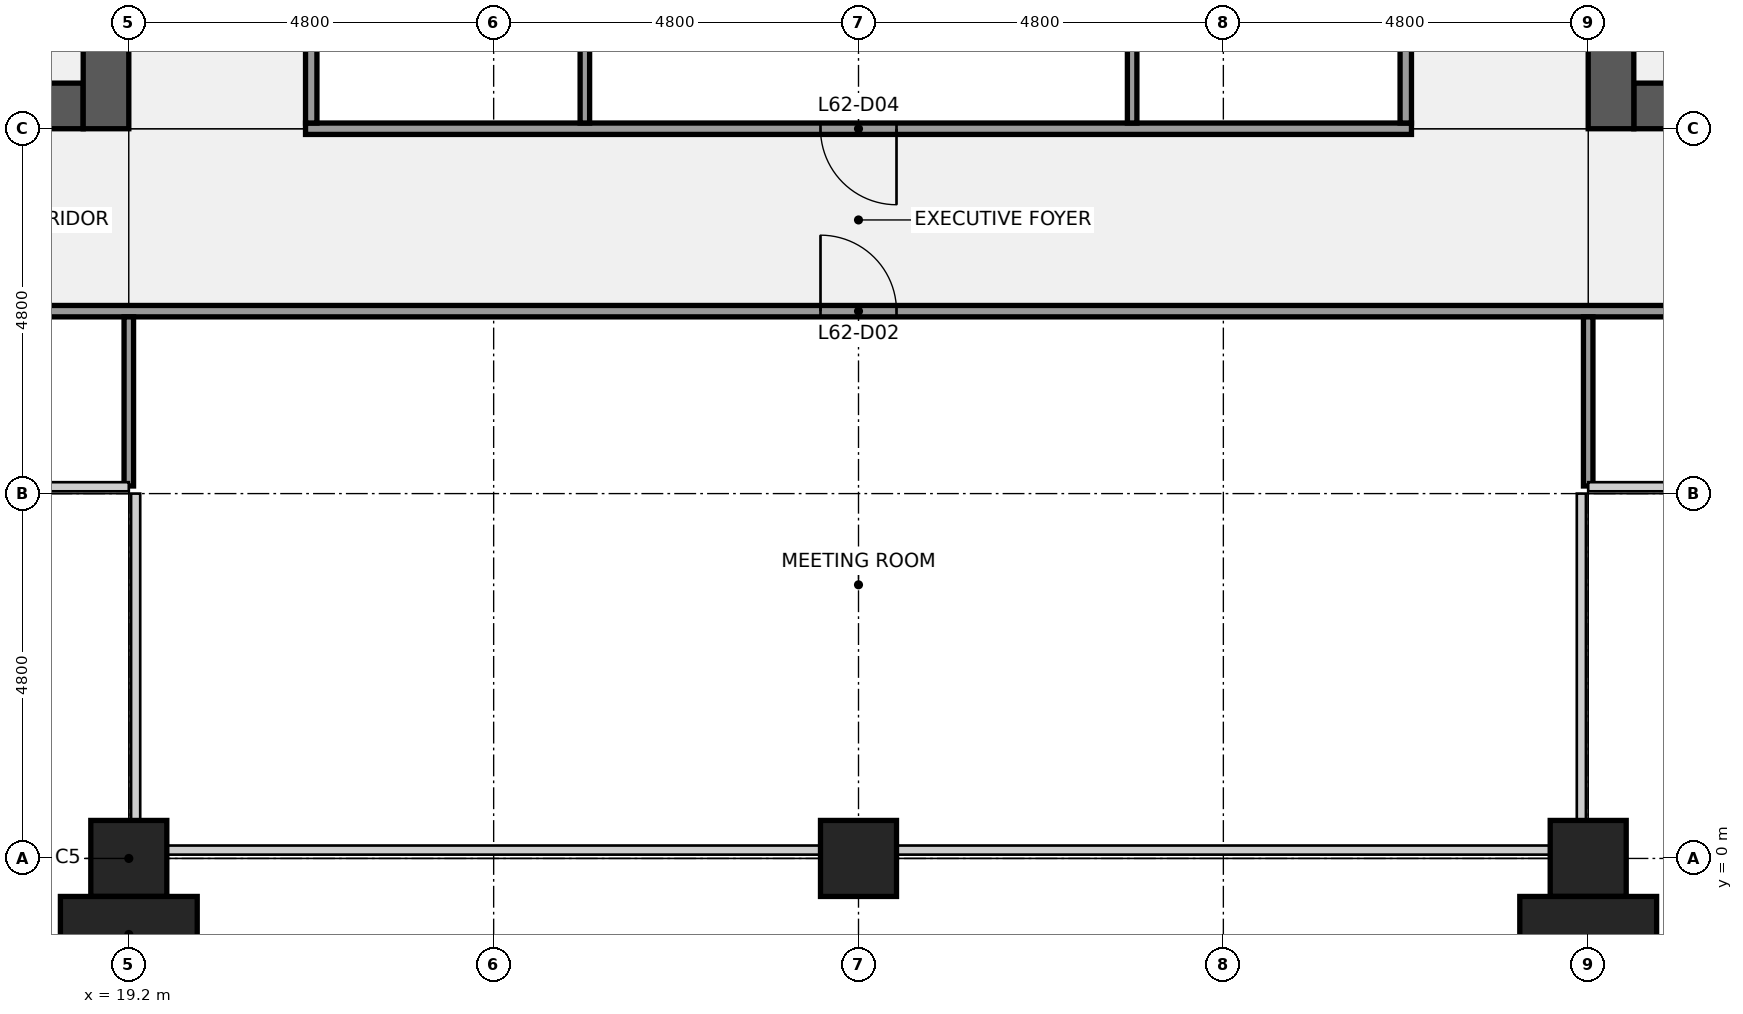
"""IFC4 building model, lengths in metres.
Left out: names, types, materials, properties, quantities, classifications, styles, units other than length and angle.
Written with IfcOpenShell. Run it as: python <this file> out.ifc"""

import sys

from ifc_helpers import new_model, si_unit, direction, frame, frame_2d, origin, origin_2d, place, context, subcontext, project, spatial, rectangle, extrude, element, fill, save


model = new_model("IFC4")
c1 = context("Model", 3, precision=1e-05, world=origin(), true_north=direction((0.0, 1.0)))
c2 = subcontext(c1, "Body", "Model", "MODEL_VIEW")
j1 = project(units=[si_unit("LENGTHUNIT", "METRE"), si_unit("PLANEANGLEUNIT", "RADIAN")], contexts=[c1])
p1 = place(None, origin())
s1 = spatial("IfcSite", under=j1, at=p1, CompositionType="ELEMENT")
p2 = place(p1, origin())
s2 = spatial("IfcBuilding", under=s1, at=p2, CompositionType="ELEMENT")
p3 = place(p2, frame((0.0, 0.0, 286.3)))
s3 = spatial("IfcBuildingStorey", under=s2, at=p3, CompositionType="ELEMENT", Elevation=286.3)
for number, where, z_axis, x_axis in (
    (1, (19.2, 0.0, 0.0), (0.0, 0.0, 1.0), (1.0, 0.0, 0.0)),
    (2, (28.8, 0.0, 0.0), (0.0, 0.0, 1.0), (1.0, 0.0, 0.0)),
    (3, (38.4, 0.0, 0.0), (0.0, 0.0, 1.0), (1.0, 0.0, 0.0)),
):
    element("IfcColumn", number, at=place(p3, frame(where, z_axis=z_axis, x_axis=x_axis)), inside=s3, PredefinedType="COLUMN", context=c2, shape_type="SweptSolid", body=[
        extrude(rectangle(XDim=1.0, YDim=1.0, at=origin_2d()), origin(), (0.0, 0.0, 1.0), 4.0),
    ])
p4 = place(p3, frame((18.6, 9.9, 0.0), z_axis=(0.0, 0.0, 1.0), x_axis=(-1.0, 0.0, 0.0)))
e4 = element("IfcWall", 4, at=p4, inside=s3, PredefinedType="SHEAR", context=c2, shape_type="SweptSolid", body=[
    extrude(rectangle(XDim=4.2, YDim=0.6, at=frame_2d((2.1, 0.0))), origin(), (0.0, 0.0, 1.0), 3.84),
])
p5 = place(p4, frame((1.25, 0.0, 0.0)))
e5 = element("IfcOpeningElement", 5, at=p5, cuts=e4, PredefinedType="OPENING", context=c2, shape_type="SweptSolid", body=[
    extrude(rectangle(XDim=1.1, YDim=2.1, at=frame_2d((0.55, 1.05))), frame((0.0, 0.31, 0.0), z_axis=(0.0, -1.0, 0.0), x_axis=(1.0, 0.0, 0.0)), (0.0, 0.0, 1.0), 0.62),
])
p6 = place(p3, frame((18.9, 38.4, 0.0), z_axis=(0.0, 0.0, 1.0), x_axis=(0.0, -1.0, 0.0)))
e6 = element("IfcWall", 6, at=p6, inside=s3, PredefinedType="SHEAR", context=c2, shape_type="SweptSolid", body=[
    extrude(rectangle(XDim=28.8, YDim=0.6, at=frame_2d((14.4, 0.0))), origin(), (0.0, 0.0, 1.0), 3.84),
])
p7 = place(p6, frame((18.3, 0.0, 0.0)))
e7 = element("IfcOpeningElement", 7, at=p7, cuts=e6, PredefinedType="OPENING", context=c2, shape_type="SweptSolid", body=[
    extrude(rectangle(XDim=1.8, YDim=2.1, at=frame_2d((0.9, 1.05))), frame((0.0, 0.31, 0.0), z_axis=(0.0, -1.0, 0.0), x_axis=(1.0, 0.0, 0.0)), (0.0, 0.0, 1.0), 0.62),
])
p8 = place(p6, frame((8.7, 0.0, 0.0)))
e8 = element("IfcOpeningElement", 8, at=p8, cuts=e6, PredefinedType="OPENING", context=c2, shape_type="SweptSolid", body=[
    extrude(rectangle(XDim=1.8, YDim=2.1, at=frame_2d((0.9, 1.05))), frame((0.0, 0.31, 0.0), z_axis=(0.0, -1.0, 0.0), x_axis=(1.0, 0.0, 0.0)), (0.0, 0.0, 1.0), 0.62),
])
p9 = place(p3, frame((43.2, 9.9, 0.0), z_axis=(0.0, 0.0, 1.0), x_axis=(-1.0, 0.0, 0.0)))
e9 = element("IfcWall", 9, at=p9, inside=s3, PredefinedType="SHEAR", context=c2, shape_type="SweptSolid", body=[
    extrude(rectangle(XDim=4.2, YDim=0.6, at=frame_2d((2.1, 0.0))), origin(), (0.0, 0.0, 1.0), 3.84),
])
p10 = place(p9, frame((1.85, 0.0, 0.0)))
e10 = element("IfcOpeningElement", 10, at=p10, cuts=e9, PredefinedType="OPENING", context=c2, shape_type="SweptSolid", body=[
    extrude(rectangle(XDim=1.1, YDim=2.1, at=frame_2d((0.55, 1.05))), frame((0.0, 0.31, 0.0), z_axis=(0.0, -1.0, 0.0), x_axis=(1.0, 0.0, 0.0)), (0.0, 0.0, 1.0), 0.62),
])
p11 = place(p3, frame((38.7, 9.6, 0.0), z_axis=(0.0, 0.0, 1.0), x_axis=(0.0, 1.0, 0.0)))
e11 = element("IfcWall", 11, at=p11, inside=s3, PredefinedType="SHEAR", context=c2, shape_type="SweptSolid", body=[
    extrude(rectangle(XDim=28.8, YDim=0.6, at=frame_2d((14.4, 0.0))), origin(), (0.0, 0.0, 1.0), 3.84),
])
p12 = place(p11, frame((8.7, 0.0, 0.0)))
e12 = element("IfcOpeningElement", 12, at=p12, cuts=e11, PredefinedType="OPENING", context=c2, shape_type="SweptSolid", body=[
    extrude(rectangle(XDim=1.8, YDim=2.1, at=frame_2d((0.9, 1.05))), frame((0.0, 0.31, 0.0), z_axis=(0.0, -1.0, 0.0), x_axis=(1.0, 0.0, 0.0)), (0.0, 0.0, 1.0), 0.62),
])
p13 = place(p11, frame((18.3, 0.0, 0.0)))
e13 = element("IfcOpeningElement", 13, at=p13, cuts=e11, PredefinedType="OPENING", context=c2, shape_type="SweptSolid", body=[
    extrude(rectangle(XDim=1.8, YDim=2.1, at=frame_2d((0.9, 1.05))), frame((0.0, 0.31, 0.0), z_axis=(0.0, -1.0, 0.0), x_axis=(1.0, 0.0, 0.0)), (0.0, 0.0, 1.0), 0.62),
])
p14 = place(p3, frame((14.5, 7.2, 0.0), z_axis=(0.0, 0.0, 1.0), x_axis=(1.0, 0.0, 0.0)))
e14 = element("IfcWall", 14, at=p14, inside=s3, PredefinedType="PARTITIONING", context=c2, shape_type="SweptSolid", body=[
    extrude(rectangle(XDim=28.6, YDim=0.15, at=frame_2d((14.3, 0.0))), origin(), (0.0, 0.0, 1.0), 2.849),
])
p15 = place(p14, frame((1.85, 0.0, 0.0)))
e15 = element("IfcOpeningElement", 15, at=p15, cuts=e14, PredefinedType="OPENING", context=c2, shape_type="SweptSolid", body=[
    extrude(rectangle(XDim=1.0, YDim=2.1, at=frame_2d((0.5, 1.05))), frame((0.0, 0.085, 0.0), z_axis=(0.0, -1.0, 0.0), x_axis=(1.0, 0.0, 0.0)), (0.0, 0.0, 1.0), 0.17),
])
p16 = place(p14, frame((13.8, 0.0, 0.0)))
e16 = element("IfcOpeningElement", 16, at=p16, cuts=e14, PredefinedType="OPENING", context=c2, shape_type="SweptSolid", body=[
    extrude(rectangle(XDim=1.0, YDim=2.1, at=frame_2d((0.5, 1.05))), frame((0.0, 0.085, 0.0), z_axis=(0.0, -1.0, 0.0), x_axis=(1.0, 0.0, 0.0)), (0.0, 0.0, 1.0), 0.17),
])
p17 = place(p14, frame((25.75, 0.0, 0.0)))
e17 = element("IfcOpeningElement", 17, at=p17, cuts=e14, PredefinedType="OPENING", context=c2, shape_type="SweptSolid", body=[
    extrude(rectangle(XDim=1.0, YDim=2.1, at=frame_2d((0.5, 1.05))), frame((0.0, 0.085, 0.0), z_axis=(0.0, -1.0, 0.0), x_axis=(1.0, 0.0, 0.0)), (0.0, 0.0, 1.0), 0.17),
])
p18 = place(p3, frame((21.525, 9.6, 0.0), z_axis=(0.0, 0.0, 1.0), x_axis=(1.0, 0.0, 0.0)))
e18 = element("IfcWall", 18, at=p18, inside=s3, PredefinedType="PARTITIONING", context=c2, shape_type="SweptSolid", body=[
    extrude(rectangle(XDim=14.55, YDim=0.15, at=frame_2d((7.275, 0.0))), origin(), (0.0, 0.0, 1.0), 2.849),
])
p19 = place(p18, frame((6.775, 0.0, 0.0)))
e19 = element("IfcOpeningElement", 19, at=p19, cuts=e18, PredefinedType="OPENING", context=c2, shape_type="SweptSolid", body=[
    extrude(rectangle(XDim=1.0, YDim=2.1, at=frame_2d((0.5, 1.05))), frame((0.0, 0.085, 0.0), z_axis=(0.0, -1.0, 0.0), x_axis=(1.0, 0.0, 0.0)), (0.0, 0.0, 1.0), 0.17),
])
p20 = place(p3, frame((19.2, 4.9, 0.0), z_axis=(0.0, 0.0, 1.0), x_axis=(0.0, 1.0, 0.0)))
e20 = element("IfcWall", 20, at=p20, inside=s3, PredefinedType="PARTITIONING", context=c2, shape_type="SweptSolid", body=[
    extrude(rectangle(XDim=2.225, YDim=0.125, at=frame_2d((1.113, 0.0))), origin(), (0.0, 0.0, 1.0), 2.849),
])
p21 = place(p3, frame((21.6, 9.675, 0.0), z_axis=(0.0, 0.0, 1.0), x_axis=(0.0, 1.0, 0.0)))
e21 = element("IfcWall", 21, at=p21, inside=s3, PredefinedType="PARTITIONING", context=c2, shape_type="SweptSolid", body=[
    extrude(rectangle(XDim=4.65, YDim=0.15, at=frame_2d((2.325, 0.0))), origin(), (0.0, 0.0, 1.0), 2.849),
])
p22 = place(p21, frame((1.825, 0.0, 0.0)))
e22 = element("IfcOpeningElement", 22, at=p22, cuts=e21, PredefinedType="OPENING", context=c2, shape_type="SweptSolid", body=[
    extrude(rectangle(XDim=1.0, YDim=2.1, at=frame_2d((0.5, 1.05))), frame((0.0, 0.085, 0.0), z_axis=(0.0, -1.0, 0.0), x_axis=(1.0, 0.0, 0.0)), (0.0, 0.0, 1.0), 0.17),
])
for number, where, z_axis, x_axis in (
    (23, (25.2, 9.675, 0.0), (0.0, 0.0, 1.0), (0.0, 1.0, 0.0)),
    (24, (32.4, 9.675, 0.0), (0.0, 0.0, 1.0), (0.0, 1.0, 0.0)),
):
    element("IfcWall", number, at=place(p3, frame(where, z_axis=z_axis, x_axis=x_axis)), inside=s3, PredefinedType="PARTITIONING", context=c2, shape_type="SweptSolid", body=[
        extrude(rectangle(XDim=4.662, YDim=0.125, at=frame_2d((2.331, 0.0))), origin(), (0.0, 0.0, 1.0), 2.849),
    ])
p23 = place(p3, frame((36.0, 9.675, 0.0), z_axis=(0.0, 0.0, 1.0), x_axis=(0.0, 1.0, 0.0)))
e25 = element("IfcWall", 25, at=p23, inside=s3, PredefinedType="PARTITIONING", context=c2, shape_type="SweptSolid", body=[
    extrude(rectangle(XDim=4.65, YDim=0.15, at=frame_2d((2.325, 0.0))), origin(), (0.0, 0.0, 1.0), 2.849),
])
p24 = place(p23, frame((1.825, 0.0, 0.0)))
e26 = element("IfcOpeningElement", 26, at=p24, cuts=e25, PredefinedType="OPENING", context=c2, shape_type="SweptSolid", body=[
    extrude(rectangle(XDim=1.0, YDim=2.1, at=frame_2d((0.5, 1.05))), frame((0.0, 0.085, 0.0), z_axis=(0.0, -1.0, 0.0), x_axis=(1.0, 0.0, 0.0)), (0.0, 0.0, 1.0), 0.17),
])
p25 = place(p3, frame((38.4, 4.9, 0.0), z_axis=(0.0, 0.0, 1.0), x_axis=(0.0, 1.0, 0.0)))
e27 = element("IfcWall", 27, at=p25, inside=s3, PredefinedType="PARTITIONING", context=c2, shape_type="SweptSolid", body=[
    extrude(rectangle(XDim=2.225, YDim=0.125, at=frame_2d((1.113, 0.0))), origin(), (0.0, 0.0, 1.0), 2.849),
])
for number, where, z_axis, x_axis in (
    (28, (19.2, -1.0, 0.0), (0.0, 0.0, 1.0), (1.0, 0.0, 0.0)),
    (29, (38.4, -1.0, 0.0), (0.0, 0.0, 1.0), (1.0, 0.0, 0.0)),
):
    element("IfcColumn", number, at=place(p3, frame(where, z_axis=z_axis, x_axis=x_axis)), inside=s3, PredefinedType="PILASTER", context=c2, shape_type="SweptSolid", body=[
        extrude(rectangle(XDim=1.8, YDim=1.0, at=origin_2d()), origin(), (0.0, 0.0, 1.0), 4.0),
    ])
p26 = place(p16, origin())
e30 = element("IfcDoor", 30, at=p26, inside=s3, OperationType="SINGLE_SWING_LEFT", PredefinedType="DOOR", context=c2, shape_type="SweptSolid", body=[
    extrude(rectangle(XDim=1.0, YDim=2.1, at=frame_2d((0.5, 1.05))), frame((0.0, 0.025, 0.0), z_axis=(0.0, -1.0, 0.0), x_axis=(1.0, 0.0, 0.0)), (0.0, 0.0, 1.0), 0.05),
])
fill(e16, e30)
p27 = place(p19, origin())
e31 = element("IfcDoor", 31, at=p27, inside=s3, OperationType="SINGLE_SWING_RIGHT", PredefinedType="DOOR", context=c2, shape_type="SweptSolid", body=[
    extrude(rectangle(XDim=1.0, YDim=2.1, at=frame_2d((0.5, 1.05))), frame((0.0, 0.025, 0.0), z_axis=(0.0, -1.0, 0.0), x_axis=(1.0, 0.0, 0.0)), (0.0, 0.0, 1.0), 0.05),
])
fill(e19, e31)
save(model, sys.argv[1])
